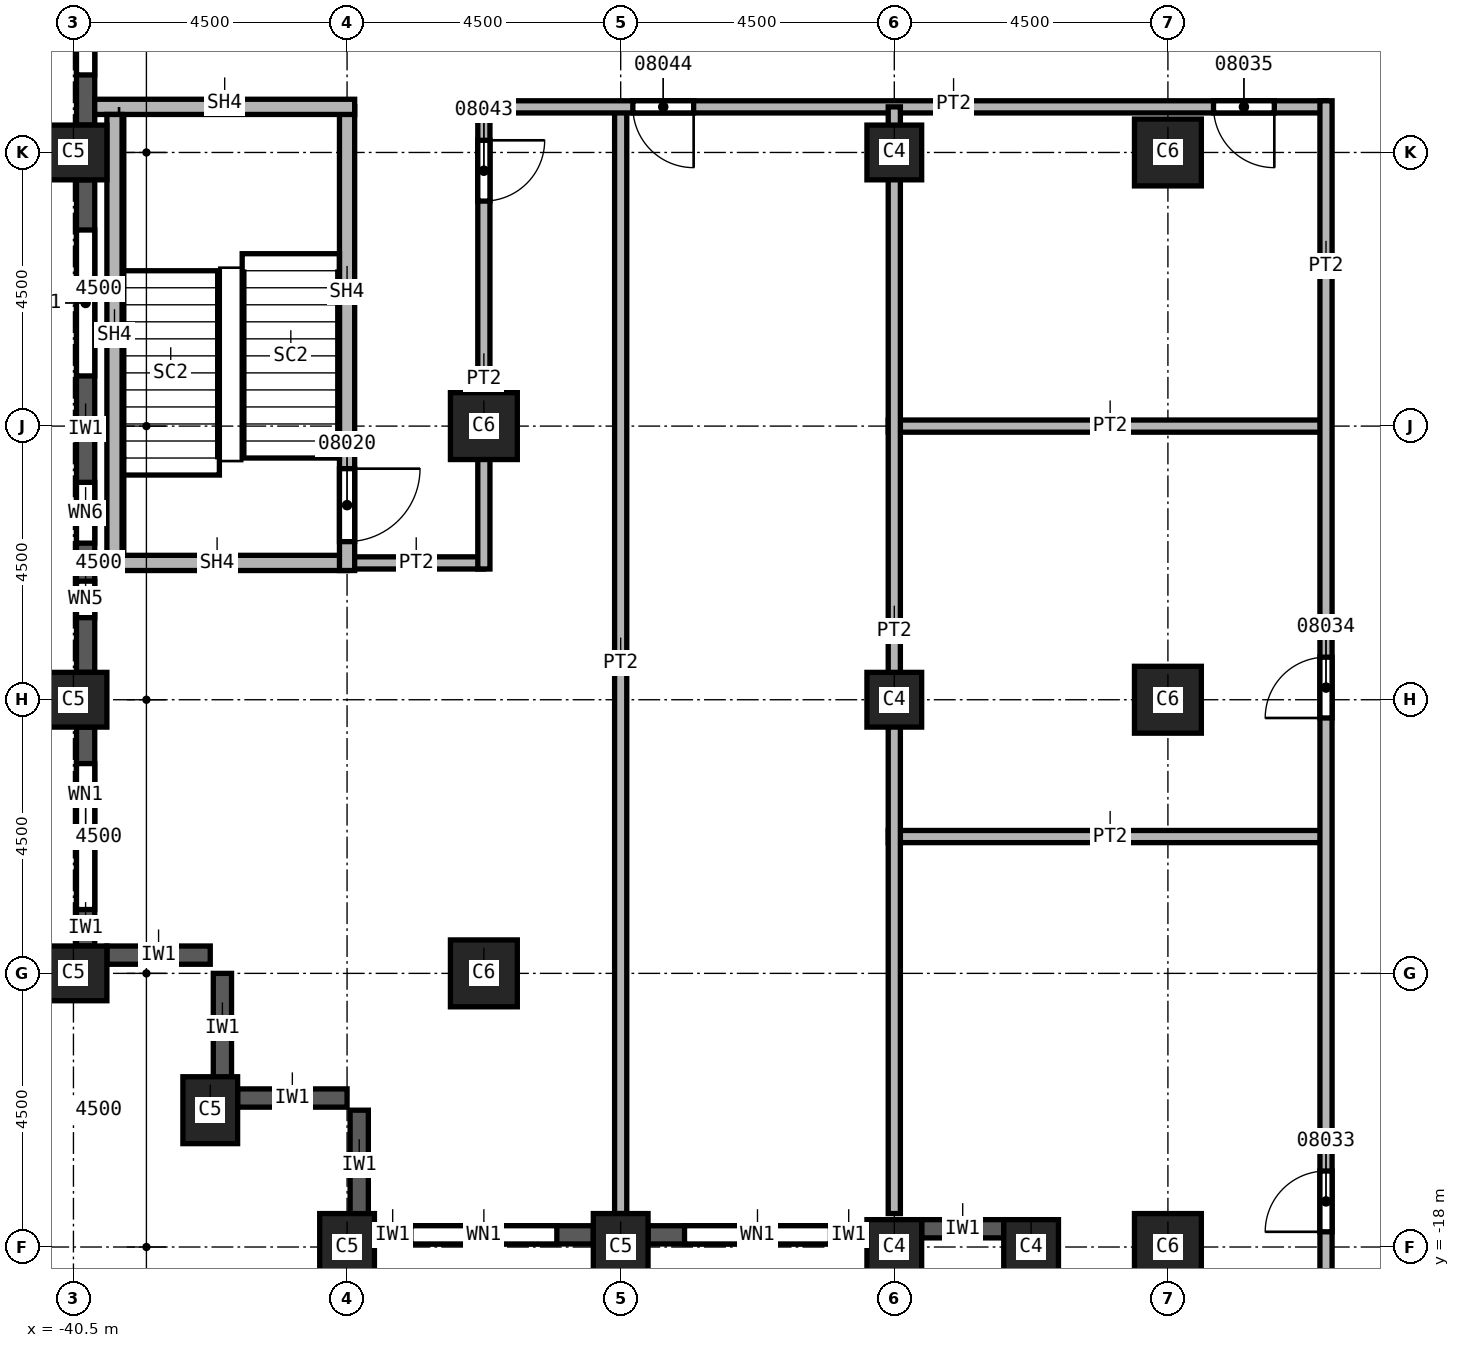
"""IFC4 building model, lengths in metres.
Left out: names, types, materials, properties, quantities, classifications, styles, units other than length and angle.
Written with IfcOpenShell. Run it as: python <this file> out.ifc"""

import sys

from ifc_helpers import new_model, si_unit, direction, frame, frame_2d, origin, origin_2d, place, context, subcontext, project, spatial, rectangle, extrude, element, fill, save


model = new_model("IFC4")
c1 = context("Model", 3, precision=1e-05, world=origin(), true_north=direction((0.0, 1.0)))
c2 = subcontext(c1, "Body", "Model", "MODEL_VIEW")
j1 = project(units=[si_unit("LENGTHUNIT", "METRE"), si_unit("PLANEANGLEUNIT", "RADIAN")], contexts=[c1])
p1 = place(None, origin())
s1 = spatial("IfcSite", under=j1, at=p1, CompositionType="ELEMENT")
p2 = place(p1, origin())
s2 = spatial("IfcBuilding", under=s1, at=p2, CompositionType="ELEMENT")
p3 = place(p2, frame((0.0, 0.0, 150.0)))
s3 = spatial("IfcBuildingStorey", under=s2, at=p3, CompositionType="ELEMENT", Elevation=150.0)
for number, where, z_axis, x_axis in (
    (1, (-40.5, 0.0, 0.0), (0.0, 0.0, 1.0), (0.0, 1.0, 0.0)),
    (2, (-40.5, -9.0, 0.0), (0.0, 0.0, 1.0), (0.0, 1.0, 0.0)),
    (3, (-40.5, -13.5, 0.0), (0.0, 0.0, 1.0), (0.0, 1.0, 0.0)),
    (4, (-38.25, -15.75, 0.0), (0.0, 0.0, 1.0), (1.0, 0.0, 0.0)),
    (5, (-31.5, -18.0, 0.0), (0.0, 0.0, 1.0), (1.0, 0.0, 0.0)),
    (6, (-36.0, -18.0, 0.0), (0.0, 0.0, 1.0), (1.0, 0.0, 0.0)),
):
    element("IfcColumn", number, at=place(p3, frame(where, z_axis=z_axis, x_axis=x_axis)), inside=s3, PredefinedType="COLUMN", context=c2, shape_type="SweptSolid", body=[
        extrude(rectangle(XDim=0.9, YDim=1.1, at=origin_2d()), origin(), (0.0, 0.0, 1.0), 3.7),
    ])
for number, where, z_axis, x_axis in (
    (7, (-33.75, -4.5, 0.0), (0.0, 0.0, 1.0), (1.0, 0.0, 0.0)),
    (8, (-33.75, -13.5, 0.0), (0.0, 0.0, 1.0), (1.0, 0.0, 0.0)),
    (9, (-22.5, 0.0, 0.0), (0.0, 0.0, 1.0), (1.0, 0.0, 0.0)),
    (10, (-22.5, -9.0, 0.0), (0.0, 0.0, 1.0), (1.0, 0.0, 0.0)),
    (11, (-22.5, -18.0, 0.0), (0.0, 0.0, 1.0), (1.0, 0.0, 0.0)),
):
    element("IfcColumn", number, at=place(p3, frame(where, z_axis=z_axis, x_axis=x_axis)), inside=s3, PredefinedType="COLUMN", context=c2, shape_type="SweptSolid", body=[
        extrude(rectangle(XDim=1.1, YDim=1.1, at=origin_2d()), origin(), (0.0, 0.0, 1.0), 3.7),
    ])
for number, where, z_axis, x_axis in (
    (12, (-27.0, 0.0, 0.0), (0.0, 0.0, 1.0), (1.0, 0.0, 0.0)),
    (13, (-27.0, -9.0, 0.0), (0.0, 0.0, 1.0), (1.0, 0.0, 0.0)),
    (14, (-27.0, -18.0, 0.0), (0.0, 0.0, 1.0), (1.0, 0.0, 0.0)),
    (15, (-24.75, -18.0, 0.0), (0.0, 0.0, 1.0), (1.0, 0.0, 0.0)),
):
    element("IfcColumn", number, at=place(p3, frame(where, z_axis=z_axis, x_axis=x_axis)), inside=s3, PredefinedType="COLUMN", context=c2, shape_type="SweptSolid", body=[
        extrude(rectangle(XDim=0.9, YDim=0.9, at=origin_2d()), origin(), (0.0, 0.0, 1.0), 3.7),
    ])
p4 = place(p3, frame((-39.95, -13.2, 0.0), z_axis=(0.0, 0.0, 1.0), x_axis=(1.0, 0.0, 0.0)))
e16 = element("IfcWall", 16, at=p4, inside=s3, PredefinedType="SOLIDWALL", context=c2, shape_type="SweptSolid", body=[
    extrude(rectangle(XDim=1.7, YDim=0.3, at=frame_2d((0.85, 0.0))), origin(), (0.0, 0.0, 1.0), 3.1),
])
for number, where, z_axis, x_axis in (
    (17, (-38.05, -15.3, 0.0), (0.0, 0.0, 1.0), (0.0, 1.0, 0.0)),
    (18, (-37.8, -15.55, 0.0), (0.0, 0.0, 1.0), (1.0, 0.0, 0.0)),
    (19, (-35.8, -17.55, 0.0), (0.0, 0.0, 1.0), (0.0, 1.0, 0.0)),
):
    element("IfcWall", number, at=place(p3, frame(where, z_axis=z_axis, x_axis=x_axis)), inside=s3, PredefinedType="SOLIDWALL", context=c2, shape_type="SweptSolid", body=[
        extrude(rectangle(XDim=1.8, YDim=0.3, at=frame_2d((0.9, 0.0))), origin(), (0.0, 0.0, 1.0), 3.1),
    ])
p5 = place(p3, frame((-40.3, 8.55, 0.0), z_axis=(0.0, 0.0, 1.0), x_axis=(0.0, -1.0, 0.0)))
e20 = element("IfcWall", 20, at=p5, inside=s3, PredefinedType="SOLIDWALL", context=c2, shape_type="SweptSolid", body=[
    extrude(rectangle(XDim=8.1, YDim=0.3, at=frame_2d((4.05, 0.0))), origin(), (0.0, 0.0, 1.0), 3.1),
])
p6 = place(p5, frame((0.825, 0.0, 0.8)))
e21 = element("IfcOpeningElement", 21, at=p6, cuts=e20, PredefinedType="OPENING", context=c2, shape_type="SweptSolid", body=[
    extrude(rectangle(XDim=2.4, YDim=1.95, at=frame_2d((1.2, 0.975))), frame((0.0, 0.15, 0.0), z_axis=(0.0, -1.0, 0.0), x_axis=(1.0, 0.0, 0.0)), (0.0, 0.0, 1.0), 0.3),
])
p7 = place(p5, frame((4.875, 0.0, 0.8)))
e22 = element("IfcOpeningElement", 22, at=p7, cuts=e20, PredefinedType="OPENING", context=c2, shape_type="SweptSolid", body=[
    extrude(rectangle(XDim=2.4, YDim=1.95, at=frame_2d((1.2, 0.975))), frame((0.0, 0.15, 0.0), z_axis=(0.0, -1.0, 0.0), x_axis=(1.0, 0.0, 0.0)), (0.0, 0.0, 1.0), 0.3),
])
p8 = place(p3, frame((-40.3, -0.45, 0.0), z_axis=(0.0, 0.0, 1.0), x_axis=(0.0, -1.0, 0.0)))
e23 = element("IfcWall", 23, at=p8, inside=s3, PredefinedType="SOLIDWALL", context=c2, shape_type="SweptSolid", body=[
    extrude(rectangle(XDim=8.1, YDim=0.3, at=frame_2d((4.05, 0.0))), origin(), (0.0, 0.0, 1.0), 3.1),
])
p9 = place(p8, frame((0.825, 0.0, 0.8)))
e24 = element("IfcOpeningElement", 24, at=p9, cuts=e23, PredefinedType="OPENING", context=c2, shape_type="SweptSolid", body=[
    extrude(rectangle(XDim=2.4, YDim=1.95, at=frame_2d((1.2, 0.975))), frame((0.0, 0.15, 0.0), z_axis=(0.0, -1.0, 0.0), x_axis=(1.0, 0.0, 0.0)), (0.0, 0.0, 1.0), 0.3),
])
p10 = place(p8, frame((4.975, 0.0, 0.8)))
e25 = element("IfcOpeningElement", 25, at=p10, cuts=e23, PredefinedType="OPENING", context=c2, shape_type="SweptSolid", body=[
    extrude(rectangle(XDim=1.0, YDim=1.95, at=frame_2d((0.5, 0.975))), frame((0.0, 0.15, 0.0), z_axis=(0.0, -1.0, 0.0), x_axis=(1.0, 0.0, 0.0)), (0.0, 0.0, 1.0), 0.3),
])
p11 = place(p8, frame((6.6, 0.0, 0.8)))
e26 = element("IfcOpeningElement", 26, at=p11, cuts=e23, PredefinedType="OPENING", context=c2, shape_type="SweptSolid", body=[
    extrude(rectangle(XDim=0.6, YDim=1.95, at=frame_2d((0.3, 0.975))), frame((0.0, 0.15, 0.0), z_axis=(0.0, -1.0, 0.0), x_axis=(1.0, 0.0, 0.0)), (0.0, 0.0, 1.0), 0.3),
])
p12 = place(p3, frame((-40.3, -9.45, 0.0), z_axis=(0.0, 0.0, 1.0), x_axis=(0.0, -1.0, 0.0)))
e27 = element("IfcWall", 27, at=p12, inside=s3, PredefinedType="SOLIDWALL", context=c2, shape_type="SweptSolid", body=[
    extrude(rectangle(XDim=3.6, YDim=0.3, at=frame_2d((1.8, 0.0))), origin(), (0.0, 0.0, 1.0), 3.1),
])
p13 = place(p12, frame((0.6, 0.0, 0.8)))
e28 = element("IfcOpeningElement", 28, at=p13, cuts=e27, PredefinedType="OPENING", context=c2, shape_type="SweptSolid", body=[
    extrude(rectangle(XDim=2.4, YDim=1.95, at=frame_2d((1.2, 0.975))), frame((0.0, 0.15, 0.0), z_axis=(0.0, -1.0, 0.0), x_axis=(1.0, 0.0, 0.0)), (0.0, 0.0, 1.0), 0.3),
])
p14 = place(p3, frame((-35.55, -17.8, 0.0), z_axis=(0.0, 0.0, 1.0), x_axis=(1.0, 0.0, 0.0)))
e29 = element("IfcWall", 29, at=p14, inside=s3, PredefinedType="SOLIDWALL", context=c2, shape_type="SweptSolid", body=[
    extrude(rectangle(XDim=3.6, YDim=0.3, at=frame_2d((1.8, 0.0))), origin(), (0.0, 0.0, 1.0), 3.1),
])
p15 = place(p14, frame((0.6, 0.0, 0.8)))
e30 = element("IfcOpeningElement", 30, at=p15, cuts=e29, PredefinedType="OPENING", context=c2, shape_type="SweptSolid", body=[
    extrude(rectangle(XDim=2.4, YDim=1.95, at=frame_2d((1.2, 0.975))), frame((0.0, 0.15, 0.0), z_axis=(0.0, -1.0, 0.0), x_axis=(1.0, 0.0, 0.0)), (0.0, 0.0, 1.0), 0.3),
])
p16 = place(p3, frame((-31.05, -17.8, 0.0), z_axis=(0.0, 0.0, 1.0), x_axis=(1.0, 0.0, 0.0)))
e31 = element("IfcWall", 31, at=p16, inside=s3, PredefinedType="SOLIDWALL", context=c2, shape_type="SweptSolid", body=[
    extrude(rectangle(XDim=3.6, YDim=0.3, at=frame_2d((1.8, 0.0))), origin(), (0.0, 0.0, 1.0), 3.1),
])
p17 = place(p16, frame((0.6, 0.0, 0.8)))
e32 = element("IfcOpeningElement", 32, at=p17, cuts=e31, PredefinedType="OPENING", context=c2, shape_type="SweptSolid", body=[
    extrude(rectangle(XDim=2.4, YDim=1.95, at=frame_2d((1.2, 0.975))), frame((0.0, 0.15, 0.0), z_axis=(0.0, -1.0, 0.0), x_axis=(1.0, 0.0, 0.0)), (0.0, 0.0, 1.0), 0.3),
])
p18 = place(p3, frame((-26.55, -17.7, 0.0), z_axis=(0.0, 0.0, 1.0), x_axis=(1.0, 0.0, 0.0)))
e33 = element("IfcWall", 33, at=p18, inside=s3, PredefinedType="SOLIDWALL", context=c2, shape_type="SweptSolid", body=[
    extrude(rectangle(XDim=1.35, YDim=0.3, at=frame_2d((0.675, 0.0))), origin(), (0.0, 0.0, 1.0), 3.1),
])
p19 = place(p3, frame((-33.75, -6.75, 0.0), z_axis=(0.0, 0.0, 1.0), x_axis=(-1.0, 0.0, 0.0)))
e34 = element("IfcWall", 34, at=p19, inside=s3, PredefinedType="PARTITIONING", context=c2, shape_type="SweptSolid", body=[
    extrude(rectangle(XDim=2.25, YDim=0.2, at=frame_2d((1.125, 0.0))), origin(), (0.0, 0.0, 1.0), 3.7),
])
p20 = place(p3, frame((-33.75, 0.75, 0.0), z_axis=(0.0, 0.0, 1.0), x_axis=(0.0, -1.0, 0.0)))
e35 = element("IfcWall", 35, at=p20, inside=s3, PredefinedType="PARTITIONING", context=c2, shape_type="SweptSolid", body=[
    extrude(rectangle(XDim=7.6, YDim=0.2, at=frame_2d((3.8, 0.0))), origin(), (0.0, 0.0, 1.0), 3.7),
])
p21 = place(p20, frame((0.55, 0.0, 0.0)))
e36 = element("IfcOpeningElement", 36, at=p21, cuts=e35, PredefinedType="OPENING", context=c2, shape_type="SweptSolid", body=[
    extrude(rectangle(XDim=1.0, YDim=2.1, at=frame_2d((0.5, 1.05))), frame((0.0, 0.1, 0.0), z_axis=(0.0, -1.0, 0.0), x_axis=(1.0, 0.0, 0.0)), (0.0, 0.0, 1.0), 0.2),
])
p22 = place(p3, frame((-31.5, 0.75, 0.0), z_axis=(0.0, 0.0, 1.0), x_axis=(0.0, -1.0, 0.0)))
e37 = element("IfcWall", 37, at=p22, inside=s3, PredefinedType="PARTITIONING", context=c2, shape_type="SweptSolid", body=[
    extrude(rectangle(XDim=18.2, YDim=0.2, at=frame_2d((9.1, 0.0))), origin(), (0.0, 0.0, 1.0), 3.7),
])
p23 = place(p3, frame((-19.9, 0.75, 0.0), z_axis=(0.0, 0.0, 1.0), x_axis=(-1.0, 0.0, 0.0)))
e38 = element("IfcWall", 38, at=p23, inside=s3, PredefinedType="PARTITIONING", context=c2, shape_type="SweptSolid", body=[
    extrude(rectangle(XDim=13.95, YDim=0.2, at=frame_2d((6.975, 0.0))), origin(), (0.0, 0.0, 1.0), 3.7),
])
p24 = place(p23, frame((0.85, 0.0, 0.0)))
e39 = element("IfcOpeningElement", 39, at=p24, cuts=e38, PredefinedType="OPENING", context=c2, shape_type="SweptSolid", body=[
    extrude(rectangle(XDim=1.0, YDim=2.1, at=frame_2d((0.5, 1.05))), frame((0.0, 0.1, 0.0), z_axis=(0.0, -1.0, 0.0), x_axis=(1.0, 0.0, 0.0)), (0.0, 0.0, 1.0), 0.2),
])
p25 = place(p23, frame((10.4, 0.0, 0.0)))
e40 = element("IfcOpeningElement", 40, at=p25, cuts=e38, PredefinedType="OPENING", context=c2, shape_type="SweptSolid", body=[
    extrude(rectangle(XDim=1.0, YDim=2.1, at=frame_2d((0.5, 1.05))), frame((0.0, 0.1, 0.0), z_axis=(0.0, -1.0, 0.0), x_axis=(1.0, 0.0, 0.0)), (0.0, 0.0, 1.0), 0.2),
])
for number, where, z_axis, x_axis in (
    (41, (-27.1, -11.25, 0.0), (0.0, 0.0, 1.0), (1.0, 0.0, 0.0)),
    (42, (-27.1, -4.5, 0.0), (0.0, 0.0, 1.0), (1.0, 0.0, 0.0)),
):
    element("IfcWall", number, at=place(p3, frame(where, z_axis=z_axis, x_axis=x_axis)), inside=s3, PredefinedType="PARTITIONING", context=c2, shape_type="SweptSolid", body=[
        extrude(rectangle(XDim=7.2, YDim=0.2, at=frame_2d((3.6, 0.0))), origin(), (0.0, 0.0, 1.0), 3.7),
    ])
p26 = place(p3, frame((-27.0, -17.45, 0.0), z_axis=(0.0, 0.0, 1.0), x_axis=(0.0, 1.0, 0.0)))
e43 = element("IfcWall", 43, at=p26, inside=s3, PredefinedType="PARTITIONING", context=c2, shape_type="SweptSolid", body=[
    extrude(rectangle(XDim=18.2, YDim=0.2, at=frame_2d((9.1, 0.0))), origin(), (0.0, 0.0, 1.0), 3.7),
])
p27 = place(p3, frame((-19.9, -23.25, 0.0), z_axis=(0.0, 0.0, 1.0), x_axis=(0.0, 1.0, 0.0)))
e44 = element("IfcWall", 44, at=p27, inside=s3, PredefinedType="PARTITIONING", context=c2, shape_type="SweptSolid", body=[
    extrude(rectangle(XDim=24.1, YDim=0.2, at=frame_2d((12.05, 0.0))), origin(), (0.0, 0.0, 1.0), 3.7),
])
p28 = place(p27, frame((5.5, 0.0, 0.0)))
e45 = element("IfcOpeningElement", 45, at=p28, cuts=e44, PredefinedType="OPENING", context=c2, shape_type="SweptSolid", body=[
    extrude(rectangle(XDim=1.0, YDim=2.1, at=frame_2d((0.5, 1.05))), frame((0.0, 0.1, 0.0), z_axis=(0.0, -1.0, 0.0), x_axis=(1.0, 0.0, 0.0)), (0.0, 0.0, 1.0), 0.2),
])
p29 = place(p27, frame((13.95, 0.0, 0.0)))
e46 = element("IfcOpeningElement", 46, at=p29, cuts=e44, PredefinedType="OPENING", context=c2, shape_type="SweptSolid", body=[
    extrude(rectangle(XDim=1.0, YDim=2.1, at=frame_2d((0.5, 1.05))), frame((0.0, 0.1, 0.0), z_axis=(0.0, -1.0, 0.0), x_axis=(1.0, 0.0, 0.0)), (0.0, 0.0, 1.0), 0.2),
])
p30 = place(p3, frame((-36.0, -6.75, 0.0), z_axis=(0.0, 0.0, 1.0), x_axis=(-1.0, 0.0, 0.0)))
e47 = element("IfcWall", 47, at=p30, inside=s3, PredefinedType="SOLIDWALL", context=c2, shape_type="SweptSolid", body=[
    extrude(rectangle(XDim=4.15, YDim=0.25, at=frame_2d((2.075, 0.0))), origin(), (0.0, 0.0, 1.0), 3.7),
])
p31 = place(p3, frame((-36.0, 0.75, 0.0), z_axis=(0.0, 0.0, 1.0), x_axis=(0.0, -1.0, 0.0)))
e48 = element("IfcWall", 48, at=p31, inside=s3, PredefinedType="SOLIDWALL", context=c2, shape_type="SweptSolid", body=[
    extrude(rectangle(XDim=7.625, YDim=0.25, at=frame_2d((3.812, 0.0))), origin(), (0.0, 0.0, 1.0), 3.7),
])
p32 = place(p31, frame((5.95, 0.0, 0.0)))
e49 = element("IfcOpeningElement", 49, at=p32, cuts=e48, PredefinedType="OPENING", context=c2, shape_type="SweptSolid", body=[
    extrude(rectangle(XDim=1.2, YDim=2.1, at=frame_2d((0.6, 1.05))), frame((0.0, 0.125, 0.0), z_axis=(0.0, -1.0, 0.0), x_axis=(1.0, 0.0, 0.0)), (0.0, 0.0, 1.0), 0.25),
])
p33 = place(p3, frame((-35.875, 0.75, 0.0), z_axis=(0.0, 0.0, 1.0), x_axis=(-1.0, 0.0, 0.0)))
e50 = element("IfcWall", 50, at=p33, inside=s3, PredefinedType="SOLIDWALL", context=c2, shape_type="SweptSolid", body=[
    extrude(rectangle(XDim=4.275, YDim=0.25, at=frame_2d((2.137, 0.0))), origin(), (0.0, 0.0, 1.0), 3.7),
])
p34 = place(p3, frame((-39.825, -6.625, 0.0), z_axis=(0.0, 0.0, 1.0), x_axis=(0.0, 1.0, 0.0)))
e51 = element("IfcWall", 51, at=p34, inside=s3, PredefinedType="SOLIDWALL", context=c2, shape_type="SweptSolid", body=[
    extrude(rectangle(XDim=7.25, YDim=0.25, at=frame_2d((3.625, 0.0))), origin(), (0.0, 0.0, 1.0), 3.7),
])
p35 = place(p7, origin())
e52 = element("IfcWindow", 52, at=p35, inside=s3, PartitioningType="SINGLE_PANEL", PredefinedType="WINDOW", context=c2, shape_type="SweptSolid", body=[
    extrude(rectangle(XDim=2.4, YDim=1.95, at=frame_2d((1.2, 0.975))), frame((0.0, 0.03, 0.0), z_axis=(0.0, -1.0, 0.0), x_axis=(1.0, 0.0, 0.0)), (0.0, 0.0, 1.0), 0.06),
])
fill(e22, e52)
p36 = place(p9, origin())
e53 = element("IfcWindow", 53, at=p36, inside=s3, PartitioningType="SINGLE_PANEL", PredefinedType="WINDOW", context=c2, shape_type="SweptSolid", body=[
    extrude(rectangle(XDim=2.4, YDim=1.95, at=frame_2d((1.2, 0.975))), frame((0.0, 0.03, 0.0), z_axis=(0.0, -1.0, 0.0), x_axis=(1.0, 0.0, 0.0)), (0.0, 0.0, 1.0), 0.06),
])
fill(e24, e53)
p37 = place(p13, origin())
e54 = element("IfcWindow", 54, at=p37, inside=s3, PartitioningType="SINGLE_PANEL", PredefinedType="WINDOW", context=c2, shape_type="SweptSolid", body=[
    extrude(rectangle(XDim=2.4, YDim=1.95, at=frame_2d((1.2, 0.975))), frame((0.0, 0.03, 0.0), z_axis=(0.0, -1.0, 0.0), x_axis=(1.0, 0.0, 0.0)), (0.0, 0.0, 1.0), 0.06),
])
fill(e28, e54)
p38 = place(p15, origin())
e55 = element("IfcWindow", 55, at=p38, inside=s3, PartitioningType="SINGLE_PANEL", PredefinedType="WINDOW", context=c2, shape_type="SweptSolid", body=[
    extrude(rectangle(XDim=2.4, YDim=1.95, at=frame_2d((1.2, 0.975))), frame((0.0, 0.03, 0.0), z_axis=(0.0, -1.0, 0.0), x_axis=(1.0, 0.0, 0.0)), (0.0, 0.0, 1.0), 0.06),
])
fill(e30, e55)
p39 = place(p17, origin())
e56 = element("IfcWindow", 56, at=p39, inside=s3, PartitioningType="SINGLE_PANEL", PredefinedType="WINDOW", context=c2, shape_type="SweptSolid", body=[
    extrude(rectangle(XDim=2.4, YDim=1.95, at=frame_2d((1.2, 0.975))), frame((0.0, 0.03, 0.0), z_axis=(0.0, -1.0, 0.0), x_axis=(1.0, 0.0, 0.0)), (0.0, 0.0, 1.0), 0.06),
])
fill(e32, e56)
p40 = place(p32, origin())
e57 = element("IfcDoor", 57, at=p40, inside=s3, OperationType="SINGLE_SWING_LEFT", PredefinedType="DOOR", context=c2, shape_type="SweptSolid", body=[
    extrude(rectangle(XDim=1.2, YDim=2.1, at=frame_2d((0.6, 1.05))), frame((0.0, 0.025, 0.0), z_axis=(0.0, -1.0, 0.0), x_axis=(1.0, 0.0, 0.0)), (0.0, 0.0, 1.0), 0.05),
])
fill(e49, e57)
p41 = place(p28, origin())
e58 = element("IfcDoor", 58, at=p41, inside=s3, OperationType="SINGLE_SWING_RIGHT", PredefinedType="DOOR", context=c2, shape_type="SweptSolid", body=[
    extrude(rectangle(XDim=1.0, YDim=2.1, at=frame_2d((0.5, 1.05))), frame((0.0, 0.025, 0.0), z_axis=(0.0, -1.0, 0.0), x_axis=(1.0, 0.0, 0.0)), (0.0, 0.0, 1.0), 0.05),
])
fill(e45, e58)
p42 = place(p29, origin())
e59 = element("IfcDoor", 59, at=p42, inside=s3, OperationType="SINGLE_SWING_LEFT", PredefinedType="DOOR", context=c2, shape_type="SweptSolid", body=[
    extrude(rectangle(XDim=1.0, YDim=2.1, at=frame_2d((0.5, 1.05))), frame((0.0, 0.025, 0.0), z_axis=(0.0, -1.0, 0.0), x_axis=(1.0, 0.0, 0.0)), (0.0, 0.0, 1.0), 0.05),
])
fill(e46, e59)
p43 = place(p24, origin())
e60 = element("IfcDoor", 60, at=p43, inside=s3, OperationType="SINGLE_SWING_RIGHT", PredefinedType="DOOR", context=c2, shape_type="SweptSolid", body=[
    extrude(rectangle(XDim=1.0, YDim=2.1, at=frame_2d((0.5, 1.05))), frame((0.0, 0.025, 0.0), z_axis=(0.0, -1.0, 0.0), x_axis=(1.0, 0.0, 0.0)), (0.0, 0.0, 1.0), 0.05),
])
fill(e39, e60)
p44 = place(p21, origin())
e61 = element("IfcDoor", 61, at=p44, inside=s3, OperationType="SINGLE_SWING_RIGHT", PredefinedType="DOOR", context=c2, shape_type="SweptSolid", body=[
    extrude(rectangle(XDim=1.0, YDim=2.1, at=frame_2d((0.5, 1.05))), frame((0.0, 0.025, 0.0), z_axis=(0.0, -1.0, 0.0), x_axis=(1.0, 0.0, 0.0)), (0.0, 0.0, 1.0), 0.05),
])
fill(e36, e61)
p45 = place(p25, origin())
e62 = element("IfcDoor", 62, at=p45, inside=s3, OperationType="SINGLE_SWING_LEFT", PredefinedType="DOOR", context=c2, shape_type="SweptSolid", body=[
    extrude(rectangle(XDim=1.0, YDim=2.1, at=frame_2d((0.5, 1.05))), frame((0.0, 0.025, 0.0), z_axis=(0.0, -1.0, 0.0), x_axis=(1.0, 0.0, 0.0)), (0.0, 0.0, 1.0), 0.05),
])
fill(e40, e62)
p46 = place(p10, origin())
e63 = element("IfcWindow", 63, at=p46, inside=s3, PartitioningType="SINGLE_PANEL", PredefinedType="WINDOW", context=c2, shape_type="SweptSolid", body=[
    extrude(rectangle(XDim=1.0, YDim=1.95, at=frame_2d((0.5, 0.975))), frame((0.0, 0.03, 0.0), z_axis=(0.0, -1.0, 0.0), x_axis=(1.0, 0.0, 0.0)), (0.0, 0.0, 1.0), 0.06),
])
fill(e25, e63)
p47 = place(p11, origin())
e64 = element("IfcWindow", 64, at=p47, inside=s3, PartitioningType="SINGLE_PANEL", PredefinedType="WINDOW", context=c2, shape_type="SweptSolid", body=[
    extrude(rectangle(XDim=0.6, YDim=1.95, at=frame_2d((0.3, 0.975))), frame((0.0, 0.03, 0.0), z_axis=(0.0, -1.0, 0.0), x_axis=(1.0, 0.0, 0.0)), (0.0, 0.0, 1.0), 0.06),
])
fill(e26, e64)
save(model, sys.argv[1])
